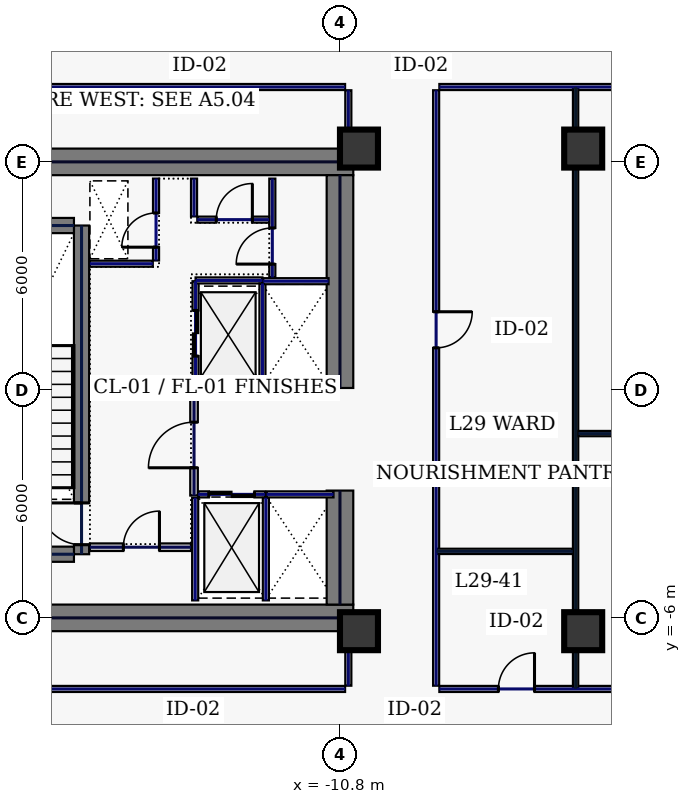
"""IFC4 building model, lengths in metres.
Left out: names, types, materials, properties, quantities, classifications, styles, units other than length and angle.
Written with IfcOpenShell. Run it as: python <this file> out.ifc"""

import sys

from ifc_helpers import new_model, si_unit, direction, frame, frame_2d, origin, origin_2d, place, context, subcontext, project, spatial, rectangle, hollow_rectangle, extrude, element, fill, save


model = new_model("IFC4")
c1 = context("Model", 3, precision=1e-05, world=origin(), true_north=direction((0.0, 1.0)))
c2 = subcontext(c1, "Body", "Model", "MODEL_VIEW")
j1 = project(units=[si_unit("LENGTHUNIT", "METRE"), si_unit("PLANEANGLEUNIT", "RADIAN")], contexts=[c1])
p1 = place(None, origin())
s1 = spatial("IfcSite", under=j1, at=p1, CompositionType="ELEMENT")
p2 = place(p1, origin())
s2 = spatial("IfcBuilding", under=s1, at=p2, CompositionType="ELEMENT")
p3 = place(p2, frame((0.0, 0.0, 129.4)))
s3 = spatial("IfcBuildingStorey", under=s2, at=p3, CompositionType="ELEMENT", Elevation=129.4)
for number, where, z_axis, x_axis in (
    (1, (-22.0, 6.0, 0.0), (0.0, 0.0, 1.0), (1.0, 0.0, 0.0)),
    (2, (-22.0, -6.0, 0.0), (0.0, 0.0, 1.0), (1.0, 0.0, 0.0)),
):
    element("IfcWall", number, at=place(p3, frame(where, z_axis=z_axis, x_axis=x_axis)), inside=s3, PredefinedType="SHEAR", context=c2, shape_type="SweptSolid", body=[
        extrude(rectangle(XDim=11.55, YDim=0.7, at=frame_2d((5.775, 0.0))), origin(), (0.0, 0.0, 1.0), 3.74),
    ])
p4 = place(p3, frame((-10.8, -5.65, 0.0), z_axis=(0.0, 0.0, 1.0), x_axis=(0.0, 1.0, 0.0)))
e3 = element("IfcWall", 3, at=p4, inside=s3, PredefinedType="SHEAR", context=c2, shape_type="SweptSolid", body=[
    extrude(rectangle(XDim=3.0, YDim=0.7, at=frame_2d((1.5, 0.0))), origin(), (0.0, 0.0, 1.0), 3.74),
])
p5 = place(p3, frame((-10.8, 0.05, 0.0), z_axis=(0.0, 0.0, 1.0), x_axis=(0.0, 1.0, 0.0)))
e4 = element("IfcWall", 4, at=p5, inside=s3, PredefinedType="SHEAR", context=c2, shape_type="SweptSolid", body=[
    extrude(rectangle(XDim=5.6, YDim=0.7, at=frame_2d((2.8, 0.0))), origin(), (0.0, 0.0, 1.0), 3.74),
])
p6 = place(p3, frame((-17.6, -4.325, 0.0), z_axis=(0.0, 0.0, 1.0), x_axis=(0.0, 1.0, 0.0)))
e5 = element("IfcWall", 5, at=p6, inside=s3, PredefinedType="SHEAR", context=c2, shape_type="SweptSolid", body=[
    extrude(rectangle(XDim=8.65, YDim=0.4, at=frame_2d((4.325, 0.0))), origin(), (0.0, 0.0, 1.0), 3.74),
])
p7 = place(p6, frame((0.25, 0.0, 0.0)))
e6 = element("IfcOpeningElement", 6, at=p7, cuts=e5, PredefinedType="OPENING", context=c2, shape_type="SweptSolid", body=[
    extrude(rectangle(XDim=1.1, YDim=2.2, at=frame_2d((0.55, 1.1))), frame((0.0, 0.21, 0.0), z_axis=(0.0, -1.0, 0.0), x_axis=(1.0, 0.0, 0.0)), (0.0, 0.0, 1.0), 0.42),
])
for number, where, z_axis, x_axis in (
    (7, (-21.2, -4.325, 0.0), (0.0, 0.0, 1.0), (1.0, 0.0, 0.0)),
    (8, (-21.2, 4.325, 0.0), (0.0, 0.0, 1.0), (1.0, 0.0, 0.0)),
):
    element("IfcWall", number, at=place(p3, frame(where, z_axis=z_axis, x_axis=x_axis)), inside=s3, PredefinedType="SHEAR", context=c2, shape_type="SweptSolid", body=[
        extrude(rectangle(XDim=3.4, YDim=0.4, at=frame_2d((1.7, 0.0))), origin(), (0.0, 0.0, 1.0), 3.74),
    ])
for number, where, z_axis, x_axis in (
    (9, (-10.3, -6.35, 0.0), (0.0, 0.0, 1.0), (1.0, 0.0, 0.0)),
    (10, (-10.3, 6.35, 0.0), (0.0, 0.0, 1.0), (1.0, 0.0, 0.0)),
    (11, (-4.4, -6.35, 0.0), (0.0, 0.0, 1.0), (1.0, 0.0, 0.0)),
    (12, (-4.4, 6.35, 0.0), (0.0, 0.0, 1.0), (1.0, 0.0, 0.0)),
):
    element("IfcColumn", number, at=place(p3, frame(where, z_axis=z_axis, x_axis=x_axis)), inside=s3, PredefinedType="COLUMN", context=c2, shape_type="SweptSolid", body=[
        extrude(hollow_rectangle(XDim=1.0, YDim=1.0, WallThickness=0.045, at=origin_2d()), origin(), (0.0, 0.0, 1.0), 3.74),
    ])
p8 = place(p3, frame((-14.6, 0.12, 0.0), z_axis=(0.0, 0.0, 1.0), x_axis=(0.0, 1.0, 0.0)))
e13 = element("IfcWall", 13, at=p8, inside=s3, PredefinedType="PARTITIONING", context=c2, shape_type="SweptSolid", body=[
    extrude(rectangle(XDim=2.74, YDim=0.16, at=frame_2d((1.37, 0.0))), origin(), (0.0, 0.0, 1.0), 3.74),
])
p9 = place(p8, frame((0.77, 0.0, 0.0)))
e14 = element("IfcOpeningElement", 14, at=p9, cuts=e13, PredefinedType="OPENING", context=c2, shape_type="SweptSolid", body=[
    extrude(rectangle(XDim=1.2, YDim=2.2, at=frame_2d((0.6, 1.1))), frame((0.0, 0.09, 0.0), z_axis=(0.0, -1.0, 0.0), x_axis=(1.0, 0.0, 0.0)), (0.0, 0.0, 1.0), 0.18),
])
for number, where, z_axis, x_axis in (
    (15, (-14.6, 0.1, 0.0), (0.0, 0.0, 1.0), (1.0, 0.0, 0.0)),
    (16, (-14.6, 2.88, 0.0), (0.0, 0.0, 1.0), (1.0, 0.0, 0.0)),
):
    element("IfcWall", number, at=place(p3, frame(where, z_axis=z_axis, x_axis=x_axis)), inside=s3, PredefinedType="PARTITIONING", context=c2, shape_type="SweptSolid", body=[
        extrude(rectangle(XDim=1.76, YDim=0.16, at=frame_2d((0.88, 0.0))), origin(), (0.0, 0.0, 1.0), 3.74),
    ])
p10 = place(p3, frame((-12.84, 0.18, 0.0), z_axis=(0.0, 0.0, 1.0), x_axis=(0.0, 1.0, 0.0)))
e17 = element("IfcWall", 17, at=p10, inside=s3, PredefinedType="PARTITIONING", context=c2, shape_type="SweptSolid", body=[
    extrude(rectangle(XDim=2.62, YDim=0.16, at=frame_2d((1.31, 0.0))), origin(), (0.0, 0.0, 1.0), 3.74),
])
p11 = place(p3, frame((-14.53, -2.75, 0.0), z_axis=(0.0, 0.0, 1.0), x_axis=(1.0, 0.0, 0.0)))
e18 = element("IfcWall", 18, at=p11, inside=s3, PredefinedType="PARTITIONING", context=c2, shape_type="SweptSolid", body=[
    extrude(rectangle(XDim=1.76, YDim=0.16, at=frame_2d((0.88, 0.0))), origin(), (0.0, 0.0, 1.0), 3.74),
])
p12 = place(p11, frame((0.28, 0.0, 0.0)))
e19 = element("IfcOpeningElement", 19, at=p12, cuts=e18, PredefinedType="OPENING", context=c2, shape_type="SweptSolid", body=[
    extrude(rectangle(XDim=1.2, YDim=2.2, at=frame_2d((0.6, 1.1))), frame((0.0, 0.09, 0.0), z_axis=(0.0, -1.0, 0.0), x_axis=(1.0, 0.0, 0.0)), (0.0, 0.0, 1.0), 0.18),
])
for number, where, z_axis, x_axis in (
    (20, (-12.75, -5.54, 0.0), (0.0, 0.0, 1.0), (0.0, 1.0, 0.0)),
    (21, (-14.61, -5.54, 0.0), (0.0, 0.0, 1.0), (0.0, 1.0, 0.0)),
):
    element("IfcWall", number, at=place(p3, frame(where, z_axis=z_axis, x_axis=x_axis)), inside=s3, PredefinedType="PARTITIONING", context=c2, shape_type="SweptSolid", body=[
        extrude(rectangle(XDim=2.7, YDim=0.16, at=frame_2d((1.35, 0.0))), origin(), (0.0, 0.0, 1.0), 3.74),
    ])
p13 = place(p3, frame((-12.73, -2.75, 0.0), z_axis=(0.0, 0.0, 1.0), x_axis=(1.0, 0.0, 0.0)))
e22 = element("IfcWall", 22, at=p13, inside=s3, PredefinedType="PARTITIONING", context=c2, shape_type="SweptSolid", body=[
    extrude(rectangle(XDim=1.76, YDim=0.16, at=frame_2d((0.88, 0.0))), origin(), (0.0, 0.0, 1.0), 3.74),
])
for number, where, z_axis, x_axis in (
    (23, (-12.82, 0.06, 0.0), (0.0, 0.0, 1.0), (1.0, 0.0, 0.0)),
    (24, (-12.82, 2.86, 0.0), (0.0, 0.0, 1.0), (1.0, 0.0, 0.0)),
):
    element("IfcWall", number, at=place(p3, frame(where, z_axis=z_axis, x_axis=x_axis)), inside=s3, PredefinedType="PARTITIONING", context=c2, shape_type="SweptSolid", body=[
        extrude(rectangle(XDim=1.72, YDim=0.16, at=frame_2d((0.86, 0.0))), origin(), (0.0, 0.0, 1.0), 3.74),
    ])
p14 = place(p3, frame((-15.64, 3.405, 0.0), z_axis=(0.0, 0.0, 1.0), x_axis=(0.0, 1.0, 0.0)))
e25 = element("IfcWall", 25, at=p14, inside=s3, PredefinedType="PARTITIONING", context=c2, shape_type="SweptSolid", body=[
    extrude(rectangle(XDim=2.155, YDim=0.16, at=frame_2d((1.078, 0.0))), origin(), (0.0, 0.0, 1.0), 3.74),
])
p15 = place(p14, frame((0.35, 0.0, 0.0)))
e26 = element("IfcOpeningElement", 26, at=p15, cuts=e25, PredefinedType="OPENING", context=c2, shape_type="SweptSolid", body=[
    extrude(rectangle(XDim=0.9, YDim=2.2, at=frame_2d((0.45, 1.1))), frame((0.0, 0.09, 0.0), z_axis=(0.0, -1.0, 0.0), x_axis=(1.0, 0.0, 0.0)), (0.0, 0.0, 1.0), 0.18),
])
p16 = place(p3, frame((-17.38, 3.32, 0.0), z_axis=(0.0, 0.0, 1.0), x_axis=(1.0, 0.0, 0.0)))
e27 = element("IfcWall", 27, at=p16, inside=s3, PredefinedType="PARTITIONING", context=c2, shape_type="SweptSolid", body=[
    extrude(rectangle(XDim=1.655, YDim=0.16, at=frame_2d((0.827, 0.0))), origin(), (0.0, 0.0, 1.0), 3.74),
])
p17 = place(p3, frame((-17.38, -4.14, 0.0), z_axis=(0.0, 0.0, 1.0), x_axis=(1.0, 0.0, 0.0)))
e28 = element("IfcWall", 28, at=p17, inside=s3, PredefinedType="SOLIDWALL", context=c2, shape_type="SweptSolid", body=[
    extrude(rectangle(XDim=2.66, YDim=0.2, at=frame_2d((1.33, 0.0))), origin(), (0.0, 0.0, 1.0), 3.74),
])
p18 = place(p17, frame((0.88, 0.0, 0.0)))
e29 = element("IfcOpeningElement", 29, at=p18, cuts=e28, PredefinedType="OPENING", context=c2, shape_type="SweptSolid", body=[
    extrude(rectangle(XDim=0.95, YDim=2.2, at=frame_2d((0.475, 1.1))), frame((0.0, 0.11, 0.0), z_axis=(0.0, -1.0, 0.0), x_axis=(1.0, 0.0, 0.0)), (0.0, 0.0, 1.0), 0.22),
])
p19 = place(p3, frame((-12.58, 2.96, 0.0), z_axis=(0.0, 0.0, 1.0), x_axis=(0.0, 1.0, 0.0)))
e30 = element("IfcWall", 30, at=p19, inside=s3, PredefinedType="PARTITIONING", context=c2, shape_type="SweptSolid", body=[
    extrude(rectangle(XDim=2.6, YDim=0.16, at=frame_2d((1.3, 0.0))), origin(), (0.0, 0.0, 1.0), 3.74),
])
p20 = place(p19, frame((0.35, 0.0, 0.0)))
e31 = element("IfcOpeningElement", 31, at=p20, cuts=e30, PredefinedType="OPENING", context=c2, shape_type="SweptSolid", body=[
    extrude(rectangle(XDim=0.95, YDim=2.2, at=frame_2d((0.475, 1.1))), frame((0.0, 0.09, 0.0), z_axis=(0.0, -1.0, 0.0), x_axis=(1.0, 0.0, 0.0)), (0.0, 0.0, 1.0), 0.18),
])
p21 = place(p3, frame((-14.555, 4.48, 0.0), z_axis=(0.0, 0.0, 1.0), x_axis=(1.0, 0.0, 0.0)))
e32 = element("IfcWall", 32, at=p21, inside=s3, PredefinedType="PARTITIONING", context=c2, shape_type="SweptSolid", body=[
    extrude(rectangle(XDim=1.89, YDim=0.16, at=frame_2d((0.945, 0.0))), origin(), (0.0, 0.0, 1.0), 3.74),
])
p22 = place(p21, frame((0.5, 0.0, 0.0)))
e33 = element("IfcOpeningElement", 33, at=p22, cuts=e32, PredefinedType="OPENING", context=c2, shape_type="SweptSolid", body=[
    extrude(rectangle(XDim=0.95, YDim=2.2, at=frame_2d((0.475, 1.1))), frame((0.0, 0.09, 0.0), z_axis=(0.0, -1.0, 0.0), x_axis=(1.0, 0.0, 0.0)), (0.0, 0.0, 1.0), 0.18),
])
p23 = place(p3, frame((-14.64, 4.565, 0.0), z_axis=(0.0, 0.0, 1.0), x_axis=(0.0, 1.0, 0.0)))
e34 = element("IfcWall", 34, at=p23, inside=s3, PredefinedType="PARTITIONING", context=c2, shape_type="SweptSolid", body=[
    extrude(rectangle(XDim=0.995, YDim=0.16, at=frame_2d((0.498, 0.0))), origin(), (0.0, 0.0, 1.0), 3.74),
])
p24 = place(p3, frame((-14.64, -2.78, 0.0), z_axis=(0.0, 0.0, 1.0), x_axis=(0.0, 1.0, 0.0)))
e35 = element("IfcWall", 35, at=p24, inside=s3, PredefinedType="SOLIDWALL", context=c2, shape_type="SweptSolid", body=[
    extrude(rectangle(XDim=2.82, YDim=0.2, at=frame_2d((1.41, 0.0))), origin(), (0.0, 0.0, 1.0), 3.74),
])
p25 = place(p24, frame((0.73, 0.0, 0.0)))
e36 = element("IfcOpeningElement", 36, at=p25, cuts=e35, PredefinedType="OPENING", context=c2, shape_type="SweptSolid", body=[
    extrude(rectangle(XDim=1.2, YDim=2.2, at=frame_2d((0.6, 1.1))), frame((0.0, 0.11, 0.0), z_axis=(0.0, -1.0, 0.0), x_axis=(1.0, 0.0, 0.0)), (0.0, 0.0, 1.0), 0.22),
])
p26 = place(p3, frame((8.185, 7.97, 0.0), z_axis=(0.0, 0.0, 1.0), x_axis=(-1.0, 0.0, 0.0)))
e37 = element("IfcWall", 37, at=p26, inside=s3, PredefinedType="PARTITIONING", context=c2, shape_type="SweptSolid", body=[
    extrude(rectangle(XDim=16.37, YDim=0.16, at=frame_2d((8.185, 0.0))), origin(), (0.0, 0.0, 1.0), 3.74),
])
p27 = place(p26, frame((7.795, 0.0, 0.0)))
e38 = element("IfcOpeningElement", 38, at=p27, cuts=e37, PredefinedType="OPENING", context=c2, shape_type="SweptSolid", body=[
    extrude(rectangle(XDim=0.95, YDim=2.2, at=frame_2d((0.475, 1.1))), frame((0.0, 0.09, 0.0), z_axis=(0.0, -1.0, 0.0), x_axis=(1.0, 0.0, 0.0)), (0.0, 0.0, 1.0), 0.18),
])
p28 = place(p3, frame((-8.27, 7.885, 0.0), z_axis=(0.0, 0.0, 1.0), x_axis=(0.0, -1.0, 0.0)))
e39 = element("IfcWall", 39, at=p28, inside=s3, PredefinedType="PARTITIONING", context=c2, shape_type="SweptSolid", body=[
    extrude(rectangle(XDim=15.67, YDim=0.16, at=frame_2d((7.835, 0.0))), origin(), (0.0, 0.0, 1.0), 3.74),
])
p29 = place(p28, frame((5.829, 0.0, 0.0)))
e40 = element("IfcOpeningElement", 40, at=p29, cuts=e39, PredefinedType="OPENING", context=c2, shape_type="SweptSolid", body=[
    extrude(rectangle(XDim=0.95, YDim=2.2, at=frame_2d((0.475, 1.1))), frame((0.0, 0.09, 0.0), z_axis=(0.0, -1.0, 0.0), x_axis=(1.0, 0.0, 0.0)), (0.0, 0.0, 1.0), 0.18),
])
p30 = place(p3, frame((-8.185, -7.87, 0.0), z_axis=(0.0, 0.0, 1.0), x_axis=(1.0, 0.0, 0.0)))
e41 = element("IfcWall", 41, at=p30, inside=s3, PredefinedType="PARTITIONING", context=c2, shape_type="SweptSolid", body=[
    extrude(rectangle(XDim=16.37, YDim=0.16, at=frame_2d((8.185, 0.0))), origin(), (0.0, 0.0, 1.0), 3.74),
])
p31 = place(p30, frame((1.554, 0.0, 0.0)))
e42 = element("IfcOpeningElement", 42, at=p31, cuts=e41, PredefinedType="OPENING", context=c2, shape_type="SweptSolid", body=[
    extrude(rectangle(XDim=0.95, YDim=2.2, at=frame_2d((0.475, 1.1))), frame((0.0, 0.09, 0.0), z_axis=(0.0, -1.0, 0.0), x_axis=(1.0, 0.0, 0.0)), (0.0, 0.0, 1.0), 0.18),
])
p32 = place(p30, frame((7.795, 0.0, 0.0)))
e43 = element("IfcOpeningElement", 43, at=p32, cuts=e41, PredefinedType="OPENING", context=c2, shape_type="SweptSolid", body=[
    extrude(rectangle(XDim=0.95, YDim=2.2, at=frame_2d((0.475, 1.1))), frame((0.0, 0.09, 0.0), z_axis=(0.0, -1.0, 0.0), x_axis=(1.0, 0.0, 0.0)), (0.0, 0.0, 1.0), 0.18),
])
p33 = place(p3, frame((-10.58, -7.785, 0.0), z_axis=(0.0, 0.0, 1.0), x_axis=(0.0, 1.0, 0.0)))
e44 = element("IfcWall", 44, at=p33, inside=s3, PredefinedType="PARTITIONING", context=c2, shape_type="SweptSolid", body=[
    extrude(rectangle(XDim=1.365, YDim=0.16, at=frame_2d((0.683, 0.0))), origin(), (0.0, 0.0, 1.0), 3.74),
])
p34 = place(p3, frame((-10.58, 6.42, 0.0), z_axis=(0.0, 0.0, 1.0), x_axis=(0.0, 1.0, 0.0)))
e45 = element("IfcWall", 45, at=p34, inside=s3, PredefinedType="PARTITIONING", context=c2, shape_type="SweptSolid", body=[
    extrude(rectangle(XDim=1.465, YDim=0.16, at=frame_2d((0.732, 0.0))), origin(), (0.0, 0.0, 1.0), 3.74),
])
for number, where, z_axis, x_axis in (
    (46, (-10.665, 7.97, 0.0), (0.0, 0.0, 1.0), (-1.0, 0.0, 0.0)),
    (47, (-25.235, -7.87, 0.0), (0.0, 0.0, 1.0), (1.0, 0.0, 0.0)),
):
    element("IfcWall", number, at=place(p3, frame(where, z_axis=z_axis, x_axis=x_axis)), inside=s3, PredefinedType="PARTITIONING", context=c2, shape_type="SweptSolid", body=[
        extrude(rectangle(XDim=14.57, YDim=0.16, at=frame_2d((7.285, 0.0))), origin(), (0.0, 0.0, 1.0), 3.74),
    ])
p35 = place(p3, frame((-4.6, -7.865, 0.0), z_axis=(0.0, 0.0, 1.0), x_axis=(0.0, 1.0, 0.0)))
e48 = element("IfcWall", 48, at=p35, inside=s3, PredefinedType="PARTITIONING", context=c2, shape_type="SweptSolid", body=[
    extrude(rectangle(XDim=15.83, YDim=0.14, at=frame_2d((7.915, 0.0))), origin(), (0.0, 0.0, 1.0), 2.935),
])
p36 = place(p3, frame((-4.525, -1.15, 0.0), z_axis=(0.0, 0.0, 1.0), x_axis=(1.0, 0.0, 0.0)))
e49 = element("IfcWall", 49, at=p36, inside=s3, PredefinedType="PARTITIONING", context=c2, shape_type="SweptSolid", body=[
    extrude(rectangle(XDim=9.05, YDim=0.14, at=frame_2d((4.525, 0.0))), origin(), (0.0, 0.0, 1.0), 3.74),
])
p37 = place(p3, frame((-8.265, -4.25, 0.0), z_axis=(0.0, 0.0, 1.0), x_axis=(1.0, 0.0, 0.0)))
e50 = element("IfcWall", 50, at=p37, inside=s3, PredefinedType="PARTITIONING", context=c2, shape_type="SweptSolid", body=[
    extrude(rectangle(XDim=3.59, YDim=0.14, at=frame_2d((1.795, 0.0))), origin(), (0.0, 0.0, 1.0), 3.74),
])
p38 = place(p7, origin())
e51 = element("IfcDoor", 51, at=p38, inside=s3, OperationType="SINGLE_SWING_RIGHT", PredefinedType="DOOR", context=c2, shape_type="SweptSolid", body=[
    extrude(rectangle(XDim=1.1, YDim=2.2, at=frame_2d((0.55, 1.1))), frame((0.0, 0.025, 0.0), z_axis=(0.0, -1.0, 0.0), x_axis=(1.0, 0.0, 0.0)), (0.0, 0.0, 1.0), 0.05),
])
fill(e6, e51)
p39 = place(p9, origin())
e52 = element("IfcDoor", 52, at=p39, inside=s3, OperationType="SLIDING_TO_LEFT", PredefinedType="DOOR", context=c2, shape_type="SweptSolid", body=[
    extrude(rectangle(XDim=1.2, YDim=2.2, at=frame_2d((0.6, 1.1))), frame((0.0, 0.025, 0.0), z_axis=(0.0, -1.0, 0.0), x_axis=(1.0, 0.0, 0.0)), (0.0, 0.0, 1.0), 0.05),
])
fill(e14, e52)
p40 = place(p12, origin())
e53 = element("IfcDoor", 53, at=p40, inside=s3, OperationType="SLIDING_TO_LEFT", PredefinedType="DOOR", context=c2, shape_type="SweptSolid", body=[
    extrude(rectangle(XDim=1.2, YDim=2.2, at=frame_2d((0.6, 1.1))), frame((0.0, 0.025, 0.0), z_axis=(0.0, -1.0, 0.0), x_axis=(1.0, 0.0, 0.0)), (0.0, 0.0, 1.0), 0.05),
])
fill(e19, e53)
p41 = place(p15, origin())
e54 = element("IfcDoor", 54, at=p41, inside=s3, OperationType="SINGLE_SWING_LEFT", PredefinedType="DOOR", context=c2, shape_type="SweptSolid", body=[
    extrude(rectangle(XDim=0.9, YDim=2.2, at=frame_2d((0.45, 1.1))), frame((0.0, 0.025, 0.0), z_axis=(0.0, -1.0, 0.0), x_axis=(1.0, 0.0, 0.0)), (0.0, 0.0, 1.0), 0.05),
])
fill(e26, e54)
p42 = place(p18, origin())
e55 = element("IfcDoor", 55, at=p42, inside=s3, OperationType="SINGLE_SWING_RIGHT", PredefinedType="DOOR", context=c2, shape_type="SweptSolid", body=[
    extrude(rectangle(XDim=0.95, YDim=2.2, at=frame_2d((0.475, 1.1))), frame((0.0, 0.025, 0.0), z_axis=(0.0, -1.0, 0.0), x_axis=(1.0, 0.0, 0.0)), (0.0, 0.0, 1.0), 0.05),
])
fill(e29, e55)
p43 = place(p20, origin())
e56 = element("IfcDoor", 56, at=p43, inside=s3, OperationType="SINGLE_SWING_LEFT", PredefinedType="DOOR", context=c2, shape_type="SweptSolid", body=[
    extrude(rectangle(XDim=0.95, YDim=2.2, at=frame_2d((0.475, 1.1))), frame((0.0, 0.025, 0.0), z_axis=(0.0, -1.0, 0.0), x_axis=(1.0, 0.0, 0.0)), (0.0, 0.0, 1.0), 0.05),
])
fill(e31, e56)
p44 = place(p22, origin())
e57 = element("IfcDoor", 57, at=p44, inside=s3, OperationType="SINGLE_SWING_RIGHT", PredefinedType="DOOR", context=c2, shape_type="SweptSolid", body=[
    extrude(rectangle(XDim=0.95, YDim=2.2, at=frame_2d((0.475, 1.1))), frame((0.0, 0.025, 0.0), z_axis=(0.0, -1.0, 0.0), x_axis=(1.0, 0.0, 0.0)), (0.0, 0.0, 1.0), 0.05),
])
fill(e33, e57)
p45 = place(p25, origin())
e58 = element("IfcDoor", 58, at=p45, inside=s3, OperationType="SINGLE_SWING_LEFT", PredefinedType="DOOR", context=c2, shape_type="SweptSolid", body=[
    extrude(rectangle(XDim=1.2, YDim=2.2, at=frame_2d((0.6, 1.1))), frame((0.0, 0.025, 0.0), z_axis=(0.0, -1.0, 0.0), x_axis=(1.0, 0.0, 0.0)), (0.0, 0.0, 1.0), 0.05),
])
fill(e36, e58)
p46 = place(p31, origin())
e59 = element("IfcDoor", 59, at=p46, inside=s3, OperationType="SINGLE_SWING_RIGHT", PredefinedType="DOOR", context=c2, shape_type="SweptSolid", body=[
    extrude(rectangle(XDim=0.95, YDim=2.2, at=frame_2d((0.475, 1.1))), frame((0.0, 0.025, 0.0), z_axis=(0.0, -1.0, 0.0), x_axis=(1.0, 0.0, 0.0)), (0.0, 0.0, 1.0), 0.05),
])
fill(e42, e59)
p47 = place(p29, origin())
e60 = element("IfcDoor", 60, at=p47, inside=s3, OperationType="SINGLE_SWING_LEFT", PredefinedType="DOOR", context=c2, shape_type="SweptSolid", body=[
    extrude(rectangle(XDim=0.95, YDim=2.2, at=frame_2d((0.475, 1.1))), frame((0.0, 0.025, 0.0), z_axis=(0.0, -1.0, 0.0), x_axis=(1.0, 0.0, 0.0)), (0.0, 0.0, 1.0), 0.05),
])
fill(e40, e60)
save(model, sys.argv[1])
